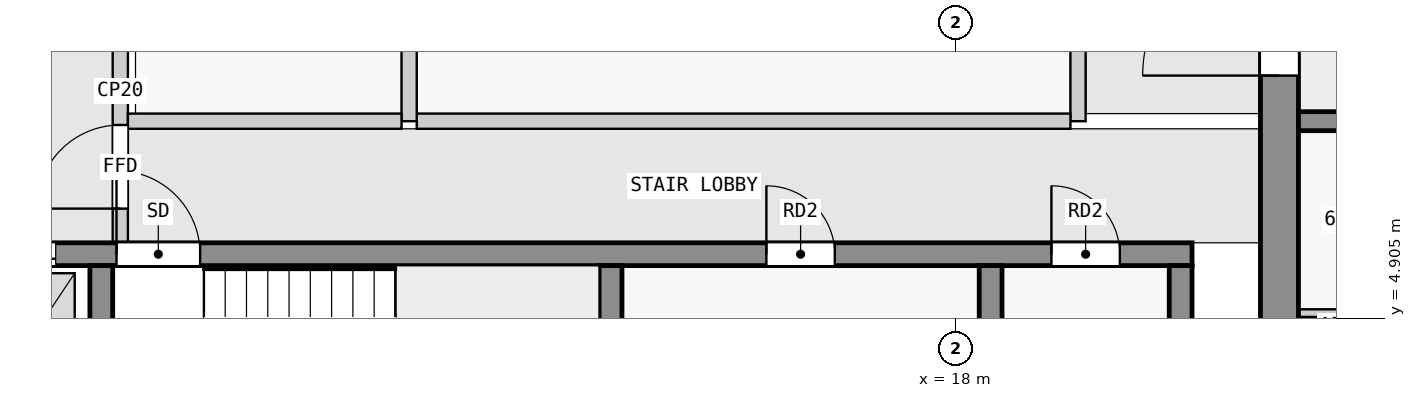
"""IFC4 building model, lengths in metres.
Left out: names, types, materials, properties, quantities, classifications, styles, units other than length and angle.
Written with IfcOpenShell. Run it as: python <this file> out.ifc"""

import sys

from ifc_helpers import new_model, si_unit, direction, frame, frame_2d, origin, place, context, subcontext, project, spatial, rectangle, extrude, element, fill, save


model = new_model("IFC4")
c1 = context("Model", 3, precision=1e-05, world=origin(), true_north=direction((0.0, 1.0)))
c2 = subcontext(c1, "Body", "Model", "MODEL_VIEW")
j1 = project(units=[si_unit("LENGTHUNIT", "METRE"), si_unit("PLANEANGLEUNIT", "RADIAN")], contexts=[c1])
p1 = place(None, origin())
s1 = spatial("IfcSite", under=j1, at=p1, CompositionType="ELEMENT")
p2 = place(p1, origin())
s2 = spatial("IfcBuilding", under=s1, at=p2, CompositionType="ELEMENT")
p3 = place(p2, frame((0.0, 0.0, 242.4)))
s3 = spatial("IfcBuildingStorey", under=s2, at=p3, CompositionType="ELEMENT", Elevation=242.4)
p4 = place(p3, frame((22.25, 2.5, 0.0), z_axis=(0.0, 0.0, 1.0), x_axis=(0.0, 1.0, 0.0)))
e1 = element("IfcWall", 1, at=p4, inside=s3, PredefinedType="SHEAR", context=c2, shape_type="SweptSolid", body=[
    extrude(rectangle(XDim=15.0, YDim=0.5, at=frame_2d((7.5, 0.0))), origin(), (0.0, 0.0, 1.0), 3.25),
])
p5 = place(p4, frame((5.6, 0.0, 0.0)))
e2 = element("IfcOpeningElement", 2, at=p5, cuts=e1, PredefinedType="OPENING", context=c2, shape_type="SweptSolid", body=[
    extrude(rectangle(XDim=1.8, YDim=2.1, at=frame_2d((0.9, 1.05))), frame((0.0, 0.26, 0.0), z_axis=(0.0, -1.0, 0.0), x_axis=(1.0, 0.0, 0.0)), (0.0, 0.0, 1.0), 0.52),
])
for number, where, z_axis, x_axis in (
    (3, (6.75, 2.8, 0.0), (0.0, 0.0, 1.0), (0.0, 1.0, 0.0)),
    (4, (13.45, 2.8, 0.0), (0.0, 0.0, 1.0), (0.0, 1.0, 0.0)),
    (5, (18.45, 2.8, 0.0), (0.0, 0.0, 1.0), (0.0, 1.0, 0.0)),
    (6, (20.95, 2.8, 0.0), (0.0, 0.0, 1.0), (0.0, 1.0, 0.0)),
):
    element("IfcWall", number, at=place(p3, frame(where, z_axis=z_axis, x_axis=x_axis)), inside=s3, PredefinedType="SHEAR", context=c2, shape_type="SweptSolid", body=[
        extrude(rectangle(XDim=2.8, YDim=0.3, at=frame_2d((1.4, 0.0))), origin(), (0.0, 0.0, 1.0), 3.25),
    ])
p6 = place(p3, frame((2.3, 5.75, 0.0), z_axis=(0.0, 0.0, 1.0), x_axis=(1.0, 0.0, 0.0)))
e7 = element("IfcWall", 7, at=p6, inside=s3, PredefinedType="SHEAR", context=c2, shape_type="SweptSolid", body=[
    extrude(rectangle(XDim=18.8, YDim=0.3, at=frame_2d((9.4, 0.0))), origin(), (0.0, 0.0, 1.0), 3.25),
])
p7 = place(p6, frame((4.65, 0.0, 0.0)))
e8 = element("IfcOpeningElement", 8, at=p7, cuts=e7, PredefinedType="OPENING", context=c2, shape_type="SweptSolid", body=[
    extrude(rectangle(XDim=1.1, YDim=2.1, at=frame_2d((0.55, 1.05))), frame((0.0, 0.16, 0.0), z_axis=(0.0, -1.0, 0.0), x_axis=(1.0, 0.0, 0.0)), (0.0, 0.0, 1.0), 0.32),
])
p8 = place(p6, frame((0.45, 0.0, 0.0)))
e9 = element("IfcOpeningElement", 9, at=p8, cuts=e7, PredefinedType="OPENING", context=c2, shape_type="SweptSolid", body=[
    extrude(rectangle(XDim=1.1, YDim=2.1, at=frame_2d((0.55, 1.05))), frame((0.0, 0.16, 0.0), z_axis=(0.0, -1.0, 0.0), x_axis=(1.0, 0.0, 0.0)), (0.0, 0.0, 1.0), 0.32),
])
p9 = place(p6, frame((2.75, 0.0, 0.0)))
e10 = element("IfcOpeningElement", 10, at=p9, cuts=e7, PredefinedType="OPENING", context=c2, shape_type="SweptSolid", body=[
    extrude(rectangle(XDim=1.1, YDim=2.1, at=frame_2d((0.55, 1.05))), frame((0.0, 0.16, 0.0), z_axis=(0.0, -1.0, 0.0), x_axis=(1.0, 0.0, 0.0)), (0.0, 0.0, 1.0), 0.32),
])
p10 = place(p6, frame((13.2, 0.0, 0.0)))
e11 = element("IfcOpeningElement", 11, at=p10, cuts=e7, PredefinedType="OPENING", context=c2, shape_type="SweptSolid", body=[
    extrude(rectangle(XDim=0.9, YDim=2.1, at=frame_2d((0.45, 1.05))), frame((0.0, 0.16, 0.0), z_axis=(0.0, -1.0, 0.0), x_axis=(1.0, 0.0, 0.0)), (0.0, 0.0, 1.0), 0.32),
])
p11 = place(p6, frame((16.95, 0.0, 0.0)))
e12 = element("IfcOpeningElement", 12, at=p11, cuts=e7, PredefinedType="OPENING", context=c2, shape_type="SweptSolid", body=[
    extrude(rectangle(XDim=0.9, YDim=2.1, at=frame_2d((0.45, 1.05))), frame((0.0, 0.16, 0.0), z_axis=(0.0, -1.0, 0.0), x_axis=(1.0, 0.0, 0.0)), (0.0, 0.0, 1.0), 0.32),
])
p12 = place(p3, frame((22.5, 7.5, 0.0), z_axis=(0.0, 0.0, 1.0), x_axis=(1.0, 0.0, 0.0)))
e13 = element("IfcWall", 13, at=p12, inside=s3, PredefinedType="SHEAR", context=c2, shape_type="SweptSolid", body=[
    extrude(rectangle(XDim=22.5, YDim=0.25, at=frame_2d((11.25, 0.0))), origin(), (0.0, 0.0, 1.0), 3.25),
])
p13 = place(p12, frame((1.75, 0.0, 0.0)))
e14 = element("IfcOpeningElement", 14, at=p13, cuts=e13, PredefinedType="OPENING", context=c2, shape_type="SweptSolid", body=[
    extrude(rectangle(XDim=1.0, YDim=2.1, at=frame_2d((0.5, 1.05))), frame((0.0, 0.135, 0.0), z_axis=(0.0, -1.0, 0.0), x_axis=(1.0, 0.0, 0.0)), (0.0, 0.0, 1.0), 0.27),
])
p14 = place(p12, frame((5.85, 0.0, 0.0)))
e15 = element("IfcOpeningElement", 15, at=p14, cuts=e13, PredefinedType="OPENING", context=c2, shape_type="SweptSolid", body=[
    extrude(rectangle(XDim=1.8, YDim=2.1, at=frame_2d((0.9, 1.05))), frame((0.0, 0.135, 0.0), z_axis=(0.0, -1.0, 0.0), x_axis=(1.0, 0.0, 0.0)), (0.0, 0.0, 1.0), 0.27),
])
p15 = place(p12, frame((13.05, 0.0, 0.0)))
e16 = element("IfcOpeningElement", 16, at=p15, cuts=e13, PredefinedType="OPENING", context=c2, shape_type="SweptSolid", body=[
    extrude(rectangle(XDim=1.0, YDim=2.1, at=frame_2d((0.5, 1.05))), frame((0.0, 0.135, 0.0), z_axis=(0.0, -1.0, 0.0), x_axis=(1.0, 0.0, 0.0)), (0.0, 0.0, 1.0), 0.27),
])
p16 = place(p12, frame((18.75, 0.0, 0.0)))
e17 = element("IfcOpeningElement", 17, at=p16, cuts=e13, PredefinedType="OPENING", context=c2, shape_type="SweptSolid", body=[
    extrude(rectangle(XDim=0.9, YDim=2.1, at=frame_2d((0.45, 1.05))), frame((0.0, 0.135, 0.0), z_axis=(0.0, -1.0, 0.0), x_axis=(1.0, 0.0, 0.0)), (0.0, 0.0, 1.0), 0.27),
])
p17 = place(p12, frame((20.95, 0.0, 0.0)))
e18 = element("IfcOpeningElement", 18, at=p17, cuts=e13, PredefinedType="OPENING", context=c2, shape_type="SweptSolid", body=[
    extrude(rectangle(XDim=1.0, YDim=2.1, at=frame_2d((0.5, 1.05))), frame((0.0, 0.135, 0.0), z_axis=(0.0, -1.0, 0.0), x_axis=(1.0, 0.0, 0.0)), (0.0, 0.0, 1.0), 0.27),
])
p18 = place(p3, frame((7.0, 5.9, 0.0), z_axis=(0.0, 0.0, 1.0), x_axis=(0.0, 1.0, 0.0)))
e19 = element("IfcWall", 19, at=p18, inside=s3, PredefinedType="PARTITIONING", context=c2, shape_type="SweptSolid", body=[
    extrude(rectangle(XDim=4.0, YDim=0.2, at=frame_2d((2.0, 0.0))), origin(), (0.0, 0.0, 1.0), 3.25),
])
p19 = place(p18, frame((0.45, 0.0, 0.0)))
e20 = element("IfcOpeningElement", 20, at=p19, cuts=e19, PredefinedType="OPENING", context=c2, shape_type="SweptSolid", body=[
    extrude(rectangle(XDim=1.1, YDim=2.1, at=frame_2d((0.55, 1.05))), frame((0.0, 0.11, 0.0), z_axis=(0.0, -1.0, 0.0), x_axis=(1.0, 0.0, 0.0)), (0.0, 0.0, 1.0), 0.22),
])
p20 = place(p3, frame((7.1, 7.5, 0.0), z_axis=(0.0, 0.0, 1.0), x_axis=(1.0, 0.0, 0.0)))
e21 = element("IfcWall", 21, at=p20, inside=s3, PredefinedType="PARTITIONING", context=c2, shape_type="SweptSolid", body=[
    extrude(rectangle(XDim=3.6, YDim=0.2, at=frame_2d((1.8, 0.0))), origin(), (0.0, 0.0, 1.0), 3.25),
])
p21 = place(p3, frame((10.8, 7.5, 0.0), z_axis=(0.0, 0.0, 1.0), x_axis=(0.0, 1.0, 0.0)))
e22 = element("IfcWall", 22, at=p21, inside=s3, PredefinedType="PARTITIONING", context=c2, shape_type="SweptSolid", body=[
    extrude(rectangle(XDim=4.7, YDim=0.2, at=frame_2d((2.35, 0.0))), origin(), (0.0, 0.0, 1.0), 3.25),
])
p22 = place(p3, frame((10.9, 7.5, 0.0), z_axis=(0.0, 0.0, 1.0), x_axis=(1.0, 0.0, 0.0)))
e23 = element("IfcWall", 23, at=p22, inside=s3, PredefinedType="PARTITIONING", context=c2, shape_type="SweptSolid", body=[
    extrude(rectangle(XDim=8.6, YDim=0.2, at=frame_2d((4.3, 0.0))), origin(), (0.0, 0.0, 1.0), 3.25),
])
p23 = place(p3, frame((19.6, 7.5, 0.0), z_axis=(0.0, 0.0, 1.0), x_axis=(0.0, 1.0, 0.0)))
e24 = element("IfcWall", 24, at=p23, inside=s3, PredefinedType="PARTITIONING", context=c2, shape_type="SweptSolid", body=[
    extrude(rectangle(XDim=4.7, YDim=0.2, at=frame_2d((2.35, 0.0))), origin(), (0.0, 0.0, 1.0), 3.25),
])
p24 = place(p3, frame((22.5, 4.975, 0.0), z_axis=(0.0, 0.0, 1.0), x_axis=(1.0, 0.0, 0.0)))
e25 = element("IfcWall", 25, at=p24, inside=s3, PredefinedType="PARTITIONING", context=c2, shape_type="SweptSolid", body=[
    extrude(rectangle(XDim=1.45, YDim=0.1, at=frame_2d((0.725, 0.0))), origin(), (0.0, 0.0, 1.0), 3.25),
])
p25 = place(p19, origin())
e26 = element("IfcDoor", 26, at=p25, inside=s3, OperationType="SINGLE_SWING_LEFT", PredefinedType="DOOR", context=c2, shape_type="SweptSolid", body=[
    extrude(rectangle(XDim=1.1, YDim=2.1, at=frame_2d((0.55, 1.05))), frame((0.0, 0.025, 0.0), z_axis=(0.0, -1.0, 0.0), x_axis=(1.0, 0.0, 0.0)), (0.0, 0.0, 1.0), 0.05),
])
fill(e20, e26)
p26 = place(p7, origin())
e27 = element("IfcDoor", 27, at=p26, inside=s3, OperationType="SINGLE_SWING_LEFT", PredefinedType="DOOR", context=c2, shape_type="SweptSolid", body=[
    extrude(rectangle(XDim=1.1, YDim=2.1, at=frame_2d((0.55, 1.05))), frame((0.0, 0.025, 0.0), z_axis=(0.0, -1.0, 0.0), x_axis=(1.0, 0.0, 0.0)), (0.0, 0.0, 1.0), 0.05),
])
fill(e8, e27)
p27 = place(p9, origin())
e28 = element("IfcDoor", 28, at=p27, inside=s3, OperationType="DOUBLE_DOOR_SLIDING", PredefinedType="DOOR", context=c2, shape_type="SweptSolid", body=[
    extrude(rectangle(XDim=1.1, YDim=2.1, at=frame_2d((0.55, 1.05))), frame((0.0, 0.025, 0.0), z_axis=(0.0, -1.0, 0.0), x_axis=(1.0, 0.0, 0.0)), (0.0, 0.0, 1.0), 0.05),
])
fill(e10, e28)
p28 = place(p5, origin())
e29 = element("IfcDoor", 29, at=p28, inside=s3, OperationType="DOUBLE_DOOR_SINGLE_SWING", PredefinedType="DOOR", context=c2, shape_type="SweptSolid", body=[
    extrude(rectangle(XDim=1.8, YDim=2.1, at=frame_2d((0.9, 1.05))), frame((0.0, 0.025, 0.0), z_axis=(0.0, -1.0, 0.0), x_axis=(1.0, 0.0, 0.0)), (0.0, 0.0, 1.0), 0.05),
])
fill(e2, e29)
p29 = place(p10, origin())
e30 = element("IfcDoor", 30, at=p29, inside=s3, OperationType="SINGLE_SWING_LEFT", PredefinedType="DOOR", context=c2, shape_type="SweptSolid", body=[
    extrude(rectangle(XDim=0.9, YDim=2.1, at=frame_2d((0.45, 1.05))), frame((0.0, 0.025, 0.0), z_axis=(0.0, -1.0, 0.0), x_axis=(1.0, 0.0, 0.0)), (0.0, 0.0, 1.0), 0.05),
])
fill(e11, e30)
p30 = place(p11, origin())
e31 = element("IfcDoor", 31, at=p30, inside=s3, OperationType="SINGLE_SWING_LEFT", PredefinedType="DOOR", context=c2, shape_type="SweptSolid", body=[
    extrude(rectangle(XDim=0.9, YDim=2.1, at=frame_2d((0.45, 1.05))), frame((0.0, 0.025, 0.0), z_axis=(0.0, -1.0, 0.0), x_axis=(1.0, 0.0, 0.0)), (0.0, 0.0, 1.0), 0.05),
])
fill(e12, e31)
save(model, sys.argv[1])
